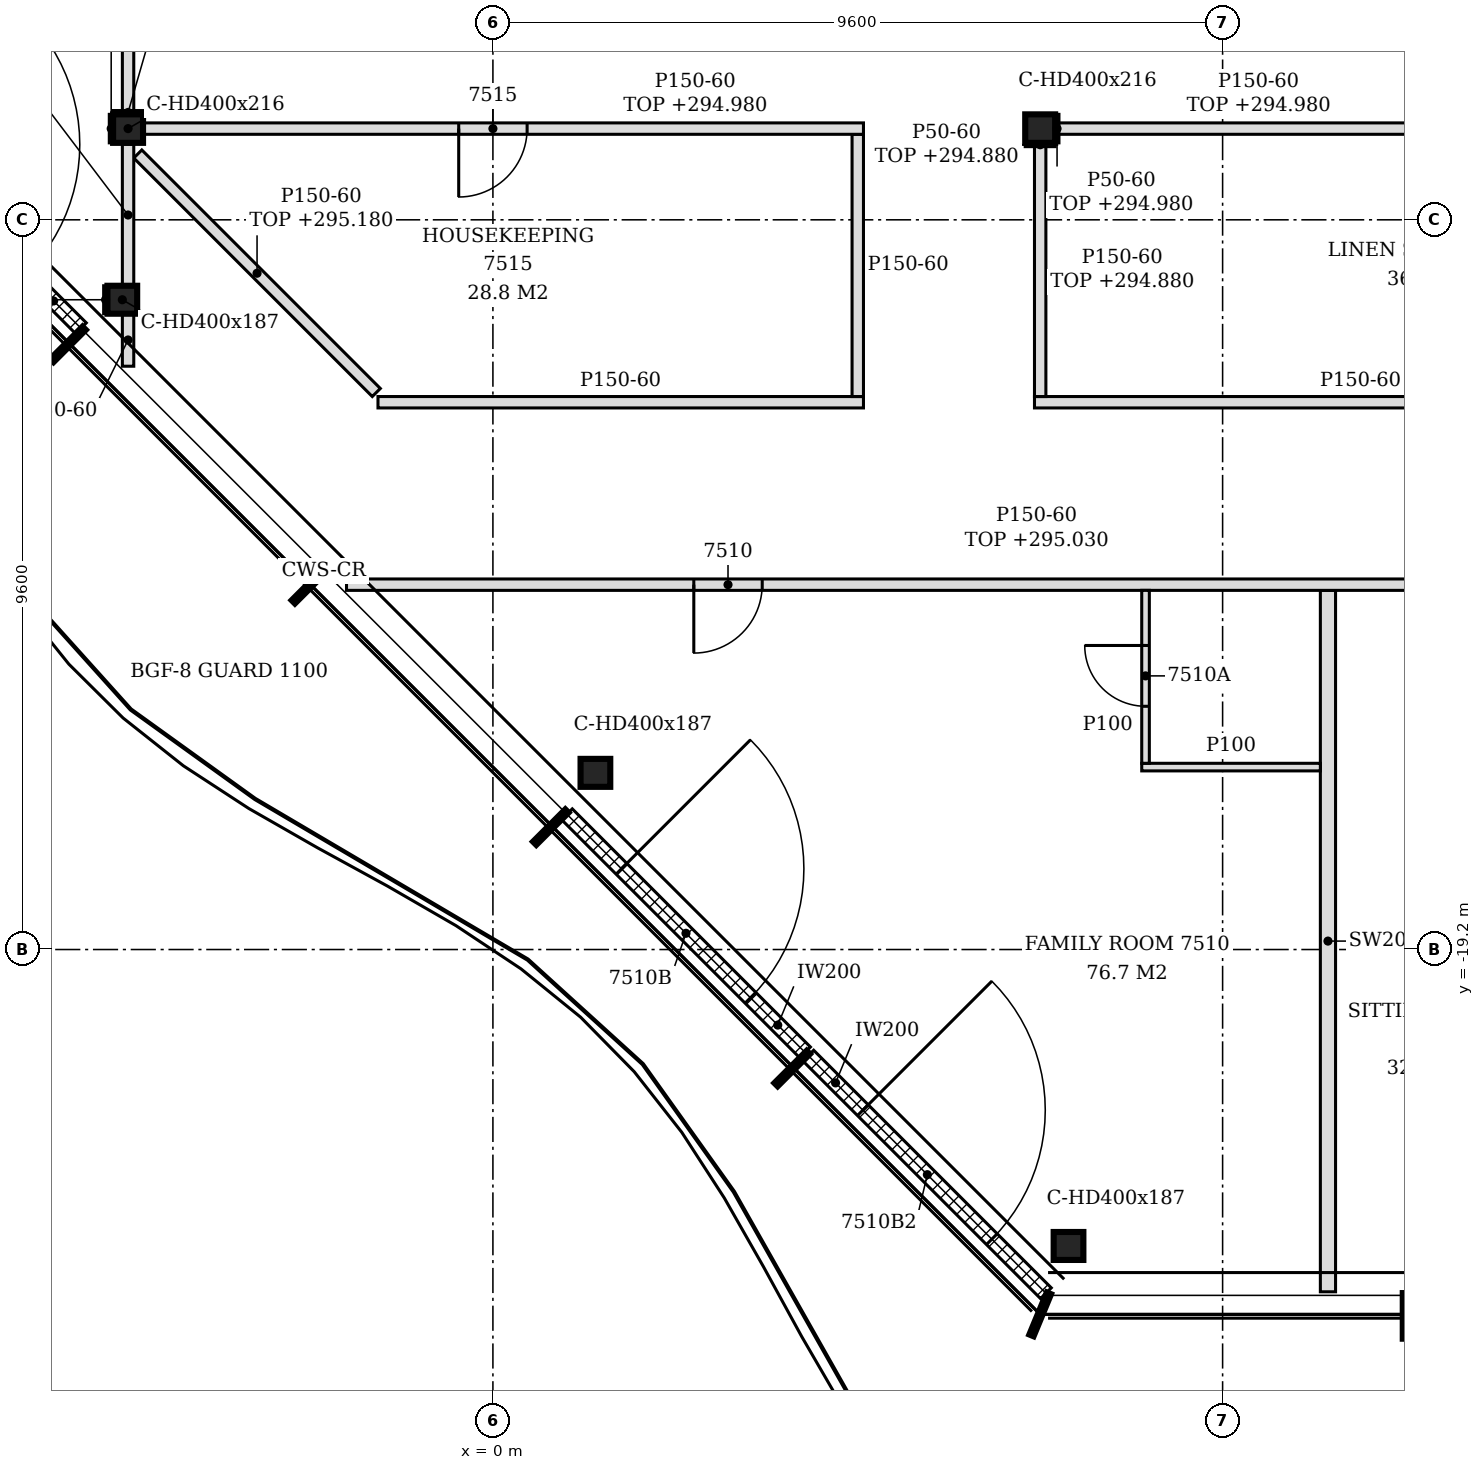
"""IFC4 building model, lengths in metres.
Left out: names, types, materials, properties, quantities, classifications, styles, units other than length and angle.
Written with IfcOpenShell. Run it as: python <this file> out.ifc"""

import sys

from ifc_helpers import new_model, si_unit, direction, frame, frame_2d, origin, origin_2d, place, context, subcontext, project, spatial, polyline, rectangle, i_section, outline, extrude, element, fill, save


model = new_model("IFC4")
c1 = context("Model", 3, precision=1e-05, world=origin(), true_north=direction((0.0, 1.0)))
c2 = subcontext(c1, "Body", "Model", "MODEL_VIEW")
j1 = project(units=[si_unit("LENGTHUNIT", "METRE"), si_unit("PLANEANGLEUNIT", "RADIAN")], contexts=[c1])
p1 = place(None, origin())
s1 = spatial("IfcSite", under=j1, at=p1, CompositionType="ELEMENT")
p2 = place(p1, origin())
s2 = spatial("IfcBuilding", under=s1, at=p2, CompositionType="ELEMENT")
p3 = place(p2, frame((0.0, 0.0, 292.2)))
s3 = spatial("IfcBuildingStorey", under=s2, at=p3, CompositionType="ELEMENT", Elevation=292.2)
for number, where, z_axis, x_axis in (
    (1, (7.573, -23.1, -0.15), (0.0, 0.0, 1.0), (1.0, 0.0, 0.0)),
    (2, (-4.876, -10.652, -0.15), (0.0, 0.0, 1.0), (1.0, 0.0, 0.0)),
    (3, (1.348, -16.876, -0.15), (0.0, 0.0, 1.0), (1.0, 0.0, 0.0)),
):
    element("IfcColumn", number, at=place(p3, frame(where, z_axis=z_axis, x_axis=x_axis)), inside=s3, PredefinedType="COLUMN", context=c2, shape_type="SweptSolid", body=[
        extrude(i_section(OverallWidth=0.391, OverallDepth=0.368, WebThickness=0.015, FlangeThickness=0.024, FilletRadius=0.015, at=origin_2d()), origin(), (0.0, 0.0, 1.0), 3.55),
    ])
for number, where, z_axis, x_axis in (
    (4, (-4.8, -8.4, -0.15), (0.0, 0.0, 1.0), (1.0, 0.0, 0.0)),
    (5, (7.2, -8.4, -0.15), (0.0, 0.0, 1.0), (1.0, 0.0, 0.0)),
):
    element("IfcColumn", number, at=place(p3, frame(where, z_axis=z_axis, x_axis=x_axis)), inside=s3, PredefinedType="COLUMN", context=c2, shape_type="SweptSolid", body=[
        extrude(i_section(OverallWidth=0.394, OverallDepth=0.375, WebThickness=0.017, FlangeThickness=0.028, FilletRadius=0.015, at=origin_2d()), origin(), (0.0, 0.0, 1.0), 3.55),
    ])
p4 = place(p3, frame((-8.553, -7.893, 0.0), z_axis=(0.0, 0.0, 1.0), x_axis=(0.707134329907, -0.707079231393, 0.0)))
e6 = element("IfcWall", 6, at=p4, inside=s3, PredefinedType="NOTDEFINED", context=c2, shape_type="SweptSolid", body=[
    extrude(rectangle(XDim=4.431, YDim=0.2, at=frame_2d((2.215, 0.0))), origin(), (0.0, 0.0, 1.0), 3.4),
])
p5 = place(p4, frame((1.015, 0.0, 0.0)))
e7 = element("IfcOpeningElement", 7, at=p5, cuts=e6, PredefinedType="OPENING", context=c2, shape_type="SweptSolid", body=[
    extrude(rectangle(XDim=2.4, YDim=2.4, at=frame_2d((1.2, 1.2))), frame((0.0, 0.11, 0.0), z_axis=(0.0, -1.0, 0.0), x_axis=(1.0, 0.0, 0.0)), (0.0, 0.0, 1.0), 0.22),
])
p6 = place(p3, frame((0.974, -17.42, 0.0), z_axis=(0.0, 0.0, 1.0), x_axis=(0.707079231393, -0.707134329907, 0.0)))
e8 = element("IfcWall", 8, at=p6, inside=s3, PredefinedType="NOTDEFINED", context=c2, shape_type="SweptSolid", body=[
    extrude(rectangle(XDim=4.431, YDim=0.2, at=frame_2d((2.215, 0.0))), origin(), (0.0, 0.0, 1.0), 3.4),
])
p7 = place(p6, frame((1.015, 0.0, 0.0)))
e9 = element("IfcOpeningElement", 9, at=p7, cuts=e8, PredefinedType="OPENING", context=c2, shape_type="SweptSolid", body=[
    extrude(rectangle(XDim=2.4, YDim=2.4, at=frame_2d((1.2, 1.2))), frame((0.0, 0.11, 0.0), z_axis=(0.0, -1.0, 0.0), x_axis=(1.0, 0.0, 0.0)), (0.0, 0.0, 1.0), 0.22),
])
p8 = place(p3, frame((4.149, -20.596, 0.0), z_axis=(0.0, 0.0, 1.0), x_axis=(0.707134392299, -0.707079168996, 0.0)))
e10 = element("IfcWall", 10, at=p8, inside=s3, PredefinedType="NOTDEFINED", context=c2, shape_type="SweptSolid", body=[
    extrude(rectangle(XDim=4.421, YDim=0.2, at=frame_2d((2.21, 0.0))), origin(), (0.0, 0.0, 1.0), 3.4),
])
p9 = place(p8, frame((1.015, 0.0, 0.0)))
e11 = element("IfcOpeningElement", 11, at=p9, cuts=e10, PredefinedType="OPENING", context=c2, shape_type="SweptSolid", body=[
    extrude(rectangle(XDim=2.4, YDim=2.4, at=frame_2d((1.2, 1.2))), frame((0.0, 0.11, 0.0), z_axis=(0.0, -1.0, 0.0), x_axis=(1.0, 0.0, 0.0)), (0.0, 0.0, 1.0), 0.22),
])
p10 = place(p3, frame((10.986, -23.703, 0.0), z_axis=(0.0, 0.0, 1.0), x_axis=(0.0, 1.0, 0.0)))
e12 = element("IfcWall", 12, at=p10, inside=s3, PredefinedType="PARTITIONING", context=c2, shape_type="SweptSolid", body=[
    extrude(outline(polyline([(0.0, 0.0), (9.228, 0.0), (9.228, 2.83), (9.198, 2.83), (9.196, 3.4), (4.608, 3.4), (4.606, 2.83), (4.398, 2.83), (4.396, 3.4), (0.753, 3.4), (0.751, 2.88), (0.453, 2.88), (0.451, 3.4), (0.0, 3.4), (0.0, 0.0)])), frame((0.0, 0.1, 0.0), z_axis=(0.0, -1.0, 0.0), x_axis=(1.0, 0.0, 0.0)), (0.0, 0.0, 1.0), 0.2),
])
p11 = place(p3, frame((8.536, -16.8, 0.0), z_axis=(0.0, 0.0, 1.0), x_axis=(1.0, 0.0, 0.0)))
e13 = element("IfcWall", 13, at=p11, inside=s3, PredefinedType="PARTITIONING", context=c2, shape_type="SweptSolid", body=[
    extrude(rectangle(XDim=2.35, YDim=0.1, at=frame_2d((1.175, 0.0))), origin(), (0.0, 0.0, 1.0), 3.4),
])
p12 = place(p3, frame((8.586, -16.75, 0.0), z_axis=(0.0, 0.0, 1.0), x_axis=(0.0, 1.0, 0.0)))
e14 = element("IfcWall", 14, at=p12, inside=s3, PredefinedType="PARTITIONING", context=c2, shape_type="SweptSolid", body=[
    extrude(outline(polyline([(0.0, 0.0), (2.275, 0.0), (2.275, 2.83), (2.245, 2.83), (2.243, 3.4), (0.0, 3.4), (0.0, 0.0)])), frame((0.0, 0.05, 0.0), z_axis=(0.0, -1.0, 0.0), x_axis=(1.0, 0.0, 0.0)), (0.0, 0.0, 1.0), 0.1),
])
p13 = place(p12, frame((0.75, 0.0, 0.0)))
e15 = element("IfcOpeningElement", 15, at=p13, cuts=e14, PredefinedType="OPENING", context=c2, shape_type="SweptSolid", body=[
    extrude(rectangle(XDim=0.8, YDim=2.1, at=frame_2d((0.4, 1.05))), frame((0.0, 0.06, 0.0), z_axis=(0.0, -1.0, 0.0), x_axis=(1.0, 0.0, 0.0)), (0.0, 0.0, 1.0), 0.12),
])
p14 = place(p3, frame((-1.926, -14.4, 0.0), z_axis=(0.0, 0.0, 1.0), x_axis=(1.0, 0.0, 0.0)))
e16 = element("IfcWall", 16, at=p14, inside=s3, PredefinedType="PARTITIONING", context=c2, shape_type="SweptSolid", body=[
    extrude(outline(polyline([(0.0, 0.0), (18.626, 0.0), (18.626, 2.83), (9.276, 2.83), (9.274, 2.68), (8.976, 2.68), (8.974, 2.83), (1.369, 2.83), (1.367, 2.58), (0.229, 2.58), (0.227, 2.83), (0.0, 2.83), (0.0, 0.0)])), frame((0.0, 0.075, 0.0), z_axis=(0.0, -1.0, 0.0), x_axis=(1.0, 0.0, 0.0)), (0.0, 0.0, 1.0), 0.15),
])
p15 = place(p14, frame((4.569, 0.0, 0.0)))
e17 = element("IfcOpeningElement", 17, at=p15, cuts=e16, PredefinedType="OPENING", context=c2, shape_type="SweptSolid", body=[
    extrude(rectangle(XDim=0.9, YDim=2.1, at=frame_2d((0.45, 1.05))), frame((0.0, 0.085, 0.0), z_axis=(0.0, -1.0, 0.0), x_axis=(1.0, 0.0, 0.0)), (0.0, 0.0, 1.0), 0.17),
])
p16 = place(p14, frame((14.169, 0.0, 0.0)))
e18 = element("IfcOpeningElement", 18, at=p16, cuts=e16, PredefinedType="OPENING", context=c2, shape_type="SweptSolid", body=[
    extrude(rectangle(XDim=0.9, YDim=2.1, at=frame_2d((0.45, 1.05))), frame((0.0, 0.085, 0.0), z_axis=(0.0, -1.0, 0.0), x_axis=(1.0, 0.0, 0.0)), (0.0, 0.0, 1.0), 0.17),
])
p17 = place(p3, frame((-1.512, -12.0, 0.0), z_axis=(0.0, 0.0, 1.0), x_axis=(1.0, 0.0, 0.0)))
e19 = element("IfcWall", 19, at=p17, inside=s3, PredefinedType="PARTITIONING", context=c2, shape_type="SweptSolid", body=[
    extrude(rectangle(XDim=6.387, YDim=0.15, at=frame_2d((3.194, 0.0))), origin(), (0.0, 0.0, 1.0), 3.4),
])
p18 = place(p3, frame((7.125, -12.0, 0.0), z_axis=(0.0, 0.0, 1.0), x_axis=(1.0, 0.0, 0.0)))
e20 = element("IfcWall", 20, at=p18, inside=s3, PredefinedType="PARTITIONING", context=c2, shape_type="SweptSolid", body=[
    extrude(outline(polyline([(0.0, 0.0), (8.581, 0.0), (8.581, 3.4), (0.225, 3.4), (0.223, 2.68), (0.0, 2.68), (0.0, 0.0)])), frame((0.0, 0.075, 0.0), z_axis=(0.0, -1.0, 0.0), x_axis=(1.0, 0.0, 0.0)), (0.0, 0.0, 1.0), 0.15),
])
p19 = place(p3, frame((-1.534, -11.872, 0.0), z_axis=(0.0, 0.0, 1.0), x_axis=(-0.707106781187, 0.707106781187, 0.0)))
e21 = element("IfcWall", 21, at=p19, inside=s3, PredefinedType="PARTITIONING", context=c2, shape_type="SweptSolid", body=[
    extrude(rectangle(XDim=4.438, YDim=0.15, at=frame_2d((2.219, 0.0))), origin(), (0.0, 0.0, 1.0), 2.98),
])
p20 = place(p3, frame((4.8, -11.925, 0.0), z_axis=(0.0, 0.0, 1.0), x_axis=(0.0, 1.0, 0.0)))
e22 = element("IfcWall", 22, at=p20, inside=s3, PredefinedType="PARTITIONING", context=c2, shape_type="SweptSolid", body=[
    extrude(outline(polyline([(0.0, 0.0), (3.45, 0.0), (3.45, 2.78), (3.375, 2.78), (3.373, 3.4), (0.0, 3.4), (0.0, 0.0)])), frame((0.0, 0.075, 0.0), z_axis=(0.0, -1.0, 0.0), x_axis=(1.0, 0.0, 0.0)), (0.0, 0.0, 1.0), 0.15),
])
p21 = place(p3, frame((7.2, -11.925, 0.0), z_axis=(0.0, 0.0, 1.0), x_axis=(0.0, 1.0, 0.0)))
e23 = element("IfcWall", 23, at=p21, inside=s3, PredefinedType="PARTITIONING", context=c2, shape_type="SweptSolid", body=[
    extrude(rectangle(XDim=3.338, YDim=0.15, at=frame_2d((1.669, 0.0))), origin(), (0.0, 0.0, 1.0), 2.68),
])
p22 = place(p3, frame((-4.8, -11.526, 0.0), z_axis=(0.0, 0.0, 1.0), x_axis=(0.0, 1.0, 0.0)))
e24 = element("IfcWall", 24, at=p22, inside=s3, PredefinedType="PARTITIONING", context=c2, shape_type="SweptSolid", body=[
    extrude(outline(polyline([(0.0, 0.0), (0.691, 0.0), (0.691, 2.58), (0.229, 2.58), (0.227, 3.4), (0.0, 3.4), (0.0, 0.0)])), frame((0.0, 0.075, 0.0), z_axis=(0.0, -1.0, 0.0), x_axis=(1.0, 0.0, 0.0)), (0.0, 0.0, 1.0), 0.15),
])
p23 = place(p3, frame((-4.8, -10.468, 0.0), z_axis=(0.0, 0.0, 1.0), x_axis=(0.0, 1.0, 0.0)))
e25 = element("IfcWall", 25, at=p23, inside=s3, PredefinedType="PARTITIONING", context=c2, shape_type="SweptSolid", body=[
    extrude(outline(polyline([(0.0, 0.0), (1.862, 0.0), (1.862, 2.98), (0.31, 2.98), (0.308, 2.58), (0.066, 2.58), (0.064, 2.98), (0.0, 2.98), (0.0, 0.0)])), frame((0.0, 0.075, 0.0), z_axis=(0.0, -1.0, 0.0), x_axis=(1.0, 0.0, 0.0)), (0.0, 0.0, 1.0), 0.15),
])
p24 = place(p3, frame((-4.603, -8.4, 0.0), z_axis=(0.0, 0.0, 1.0), x_axis=(1.0, 0.0, 0.0)))
e26 = element("IfcWall", 26, at=p24, inside=s3, PredefinedType="PARTITIONING", context=c2, shape_type="SweptSolid", body=[
    extrude(rectangle(XDim=9.478, YDim=0.15, at=frame_2d((4.739, 0.0))), origin(), (0.0, 0.0, 1.0), 2.78),
])
p25 = place(p24, frame((4.153, 0.0, 0.0)))
e27 = element("IfcOpeningElement", 27, at=p25, cuts=e26, PredefinedType="OPENING", context=c2, shape_type="SweptSolid", body=[
    extrude(rectangle(XDim=0.9, YDim=2.1, at=frame_2d((0.45, 1.05))), frame((0.0, 0.085, 0.0), z_axis=(0.0, -1.0, 0.0), x_axis=(1.0, 0.0, 0.0)), (0.0, 0.0, 1.0), 0.17),
])
p26 = place(p3, frame((7.397, -8.4, 0.0), z_axis=(0.0, 0.0, 1.0), x_axis=(1.0, 0.0, 0.0)))
e28 = element("IfcWall", 28, at=p26, inside=s3, PredefinedType="PARTITIONING", context=c2, shape_type="SweptSolid", body=[
    extrude(rectangle(XDim=11.606, YDim=0.15, at=frame_2d((5.803, 0.0))), origin(), (0.0, 0.0, 1.0), 2.78),
])
p27 = place(p26, frame((5.353, 0.0, 0.0)))
e29 = element("IfcOpeningElement", 29, at=p27, cuts=e28, PredefinedType="OPENING", context=c2, shape_type="SweptSolid", body=[
    extrude(rectangle(XDim=0.9, YDim=2.1, at=frame_2d((0.45, 1.05))), frame((0.0, 0.085, 0.0), z_axis=(0.0, -1.0, 0.0), x_axis=(1.0, 0.0, 0.0)), (0.0, 0.0, 1.0), 0.17),
])
p28 = place(p3, frame((-4.8, -8.212, 0.0), z_axis=(0.0, 0.0, 1.0), x_axis=(0.0, 1.0, 0.0)))
e30 = element("IfcWall", 30, at=p28, inside=s3, PredefinedType="PARTITIONING", context=c2, shape_type="SweptSolid", body=[
    extrude(rectangle(XDim=10.425, YDim=0.15, at=frame_2d((5.212, 0.0))), origin(), (0.0, 0.0, 1.0), 2.78),
])
p29 = place(p28, frame((8.113, 0.0, 0.0)))
e31 = element("IfcOpeningElement", 31, at=p29, cuts=e30, PredefinedType="OPENING", context=c2, shape_type="SweptSolid", body=[
    extrude(rectangle(XDim=1.8, YDim=2.1, at=frame_2d((0.9, 1.05))), frame((0.0, 0.085, 0.0), z_axis=(0.0, -1.0, 0.0), x_axis=(1.0, 0.0, 0.0)), (0.0, 0.0, 1.0), 0.17),
])
p30 = place(p3, frame((7.422, -8.587, 0.0), z_axis=(0.0, 0.0, 1.0), x_axis=(0.0, 1.0, 0.0)))
e32 = element("IfcWall", 32, at=p30, inside=s3, PredefinedType="PARTITIONING", context=c2, shape_type="SweptSolid", body=[
    extrude(rectangle(XDim=0.375, YDim=0.05, at=frame_2d((0.188, 0.0))), origin(), (0.0, 0.0, 1.0), 2.78),
])
p31 = place(p3, frame((-5.096, -10.835, 0.0), z_axis=(0.0, 0.0, 1.0), x_axis=(0.0, 1.0, 0.0)))
e33 = element("IfcWall", 33, at=p31, inside=s3, PredefinedType="PARTITIONING", context=c2, shape_type="SweptSolid", body=[
    extrude(rectangle(XDim=0.368, YDim=0.05, at=frame_2d((0.184, 0.0))), origin(), (0.0, 0.0, 1.0), 2.58),
])
p32 = place(p3, frame((-5.022, -8.587, 0.0), z_axis=(0.0, 0.0, 1.0), x_axis=(0.0, 1.0, 0.0)))
e34 = element("IfcWall", 34, at=p32, inside=s3, PredefinedType="PARTITIONING", context=c2, shape_type="SweptSolid", body=[
    extrude(rectangle(XDim=0.375, YDim=0.05, at=frame_2d((0.188, 0.0))), origin(), (0.0, 0.0, 1.0), 3.4),
])
p33 = place(p3, frame((-4.997, -8.188, 0.0), z_axis=(0.0, 0.0, 1.0), x_axis=(1.0, 0.0, 0.0)))
e35 = element("IfcWall", 35, at=p33, inside=s3, PredefinedType="PARTITIONING", context=c2, shape_type="SweptSolid", body=[
    extrude(rectangle(XDim=0.394, YDim=0.05, at=frame_2d((0.197, 0.0))), origin(), (0.0, 0.0, 1.0), 2.78),
])
p34 = place(p3, frame((7.003, -8.613, 0.0), z_axis=(0.0, 0.0, 1.0), x_axis=(1.0, 0.0, 0.0)))
e36 = element("IfcWall", 36, at=p34, inside=s3, PredefinedType="PARTITIONING", context=c2, shape_type="SweptSolid", body=[
    extrude(rectangle(XDim=0.394, YDim=0.05, at=frame_2d((0.197, 0.0))), origin(), (0.0, 0.0, 1.0), 2.68),
])
p35 = place(p7, origin())
e37 = element("IfcDoor", 37, at=p35, inside=s3, OperationType="SINGLE_SWING_LEFT", PredefinedType="DOOR", context=c2, shape_type="SweptSolid", body=[
    extrude(rectangle(XDim=2.4, YDim=2.4, at=frame_2d((1.2, 1.2))), frame((0.0, 0.025, 0.0), z_axis=(0.0, -1.0, 0.0), x_axis=(1.0, 0.0, 0.0)), (0.0, 0.0, 1.0), 0.05),
])
fill(e9, e37)
p36 = place(p9, origin())
e38 = element("IfcDoor", 38, at=p36, inside=s3, OperationType="SINGLE_SWING_LEFT", PredefinedType="DOOR", context=c2, shape_type="SweptSolid", body=[
    extrude(rectangle(XDim=2.4, YDim=2.4, at=frame_2d((1.2, 1.2))), frame((0.0, 0.025, 0.0), z_axis=(0.0, -1.0, 0.0), x_axis=(1.0, 0.0, 0.0)), (0.0, 0.0, 1.0), 0.05),
])
fill(e11, e38)
p37 = place(p15, frame((0.9, 0.0, 0.0), z_axis=(0.0, 0.0, 1.0), x_axis=(-1.0, 0.0, 0.0)))
e39 = element("IfcDoor", 39, at=p37, inside=s3, OperationType="SINGLE_SWING_RIGHT", PredefinedType="DOOR", context=c2, shape_type="SweptSolid", body=[
    extrude(rectangle(XDim=0.9, YDim=2.1, at=frame_2d((0.45, 1.05))), frame((0.0, 0.025, 0.0), z_axis=(0.0, -1.0, 0.0), x_axis=(1.0, 0.0, 0.0)), (0.0, 0.0, 1.0), 0.05),
])
fill(e17, e39)
p38 = place(p13, origin())
e40 = element("IfcDoor", 40, at=p38, inside=s3, OperationType="SINGLE_SWING_RIGHT", PredefinedType="DOOR", context=c2, shape_type="SweptSolid", body=[
    extrude(rectangle(XDim=0.8, YDim=2.1, at=frame_2d((0.4, 1.05))), frame((0.0, 0.025, 0.0), z_axis=(0.0, -1.0, 0.0), x_axis=(1.0, 0.0, 0.0)), (0.0, 0.0, 1.0), 0.05),
])
fill(e15, e40)
p39 = place(p25, frame((0.9, 0.0, 0.0), z_axis=(0.0, 0.0, 1.0), x_axis=(-1.0, 0.0, 0.0)))
e41 = element("IfcDoor", 41, at=p39, inside=s3, OperationType="SINGLE_SWING_RIGHT", PredefinedType="DOOR", context=c2, shape_type="SweptSolid", body=[
    extrude(rectangle(XDim=0.9, YDim=2.1, at=frame_2d((0.45, 1.05))), frame((0.0, 0.025, 0.0), z_axis=(0.0, -1.0, 0.0), x_axis=(1.0, 0.0, 0.0)), (0.0, 0.0, 1.0), 0.05),
])
fill(e27, e41)
save(model, sys.argv[1])
